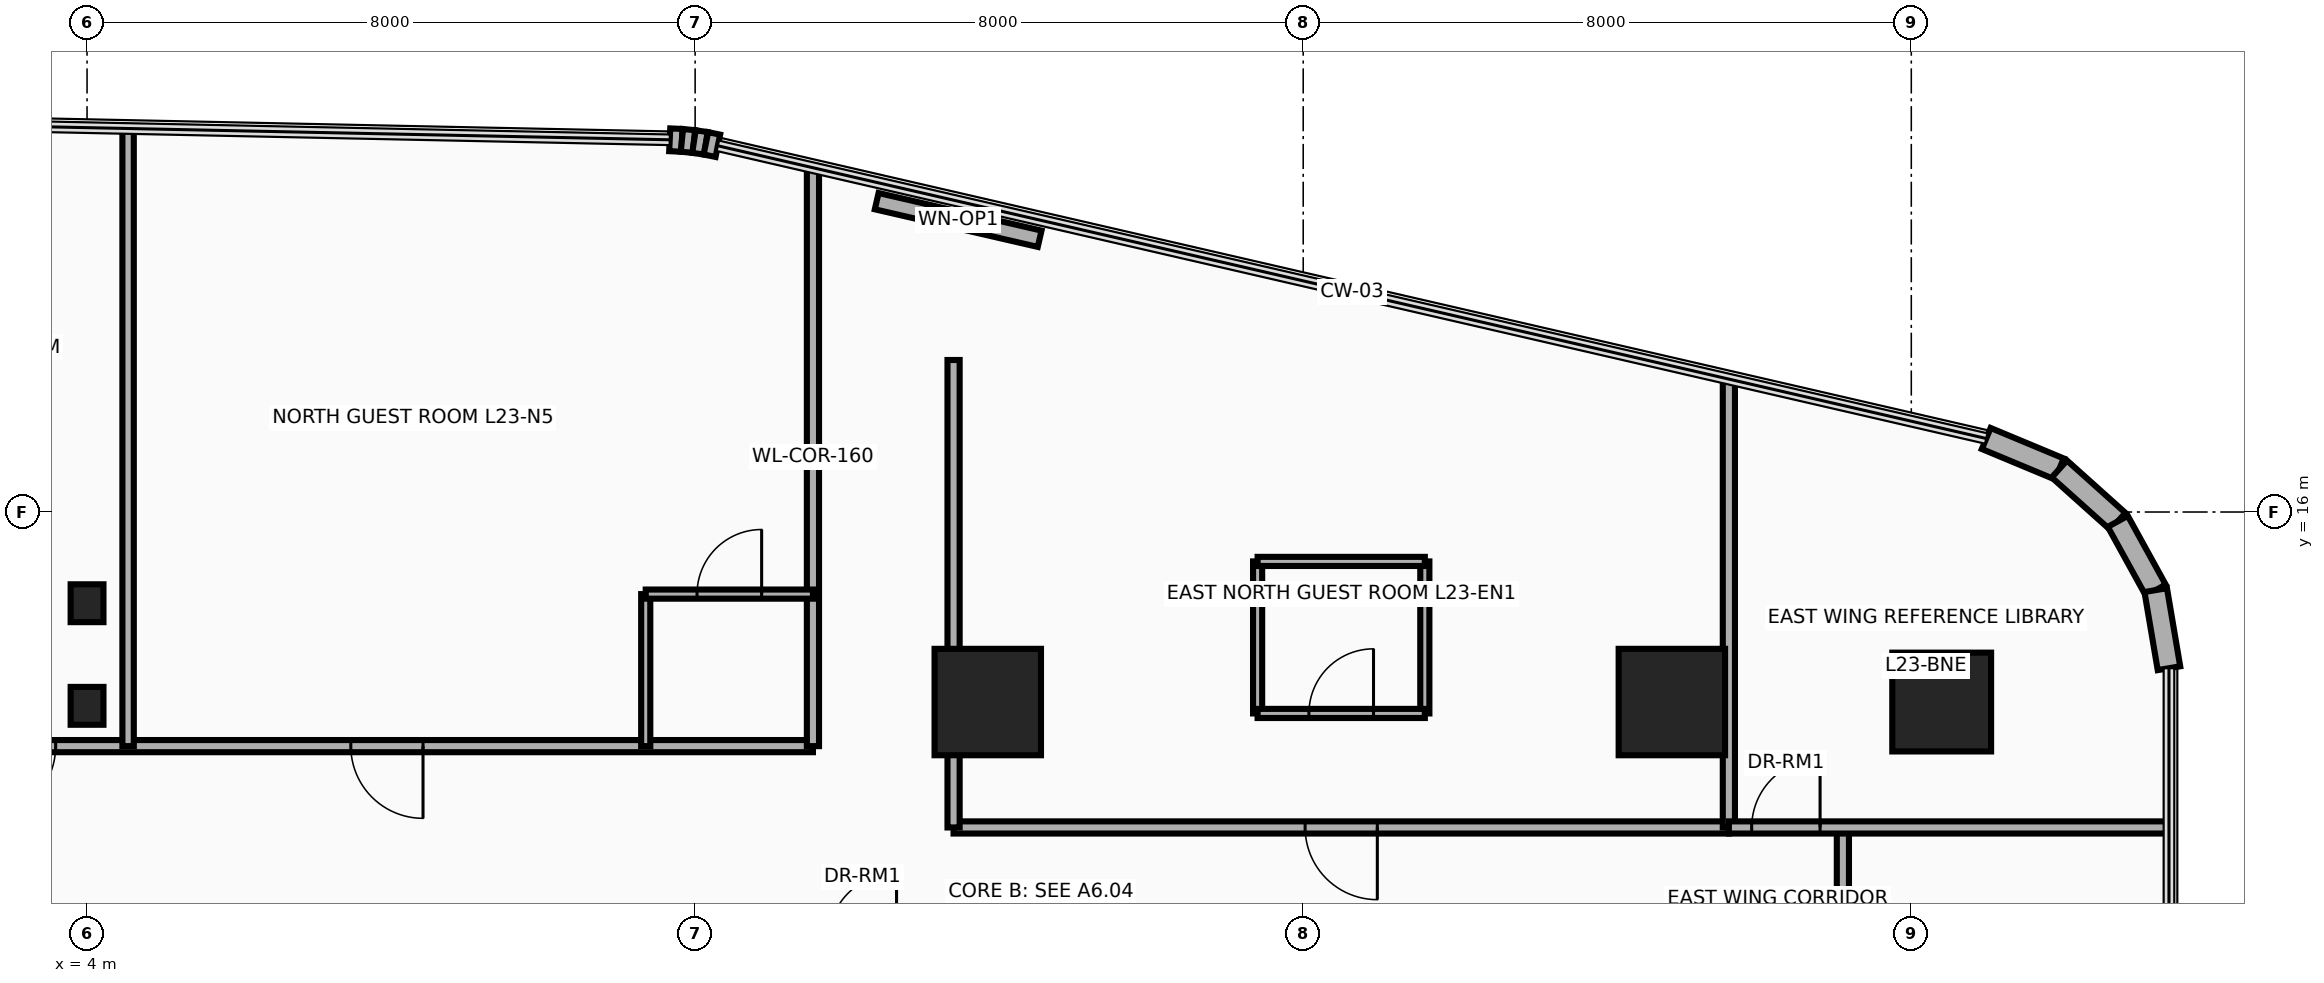
"""IFC4 building model, lengths in metres.
Left out: names, types, materials, properties, quantities, classifications, styles, units other than length and angle.
Written with IfcOpenShell. Run it as: python <this file> out.ifc"""

import sys

from ifc_helpers import new_model, si_unit, direction, frame, frame_2d, origin, origin_2d, place, context, subcontext, project, spatial, rectangle, circle, i_section, extrude, source, transform, mapped, element, fill, save


model = new_model("IFC4")
c1 = context("Model", 3, precision=1e-05, world=origin(), true_north=direction((0.0, 1.0)))
c2 = subcontext(c1, "Body", "Model", "MODEL_VIEW")
j1 = project(units=[si_unit("LENGTHUNIT", "METRE"), si_unit("PLANEANGLEUNIT", "RADIAN")], contexts=[c1])
p1 = place(None, origin())
s1 = spatial("IfcSite", under=j1, at=p1, CompositionType="ELEMENT")
p2 = place(p1, origin())
s2 = spatial("IfcBuilding", under=s1, at=p2, CompositionType="ELEMENT")
p3 = place(p2, frame((0.0, 0.0, 92.6)))
s3 = spatial("IfcBuildingStorey", under=s2, at=p3, CompositionType="ELEMENT", Elevation=92.6)
m1 = source(origin(), c2, "Body", "SweptSolid", [
    extrude(rectangle(XDim=1.4, YDim=1.4, at=origin_2d()), origin(), (0.0, 0.0, 1.0), 3.7),
])
for number, where, z_axis, x_axis in (
    (1, (15.85, 13.5, 0.0), (0.0, 0.0, 1.0), (1.0, 0.0, 0.0)),
    (2, (24.85, 13.5, 0.0), (0.0, 0.0, 1.0), (1.0, 0.0, 0.0)),
):
    element("IfcColumn", number, at=place(p3, frame(where, z_axis=z_axis, x_axis=x_axis)), inside=s3, PredefinedType="COLUMN", context=c2, shape_type="MappedRepresentation", body=[
        mapped(m1, transform((0.0, 0.0, 0.0), x_axis=(1.0, 0.0, 0.0), y_axis=(0.0, 1.0, 0.0), z_axis=(0.0, 0.0, 1.0), scale=1.0)),
    ])
m2 = source(origin(), c2, "Body", "SweptSolid", [
    extrude(circle(Radius=0.65, at=origin_2d()), origin(), (0.0, 0.0, 1.0), 3.7),
])
p4 = place(p3, frame((28.4, 13.5, 0.0), z_axis=(0.0, 0.0, 1.0), x_axis=(1.0, 0.0, 0.0)))
e3 = element("IfcColumn", 3, at=p4, inside=s3, PredefinedType="COLUMN", context=c2, shape_type="MappedRepresentation", body=[
    mapped(m2, transform((0.0, 0.0, 0.0), x_axis=(1.0, 0.0, 0.0), y_axis=(0.0, 1.0, 0.0), z_axis=(0.0, 0.0, 1.0), scale=1.0)),
])
m3 = source(origin(), c2, "Body", "SweptSolid", [
    extrude(i_section(OverallWidth=0.432, OverallDepth=0.498, WebThickness=0.056, FlangeThickness=0.089, at=origin_2d()), origin(), (0.0, 0.0, 1.0), 3.7),
])
for number, where, z_axis, x_axis in (
    (4, (4.0, 13.45, 0.0), (0.0, 0.0, 1.0), (1.0, 0.0, 0.0)),
    (5, (4.0, 14.8, 0.0), (0.0, 0.0, 1.0), (1.0, 0.0, 0.0)),
):
    element("IfcColumn", number, at=place(p3, frame(where, z_axis=z_axis, x_axis=x_axis)), inside=s3, PredefinedType="COLUMN", context=c2, shape_type="MappedRepresentation", body=[
        mapped(m3, transform((0.0, 0.0, 0.0), x_axis=(1.0, 0.0, 0.0), y_axis=(0.0, 1.0, 0.0), z_axis=(0.0, 0.0, 1.0), scale=1.0)),
    ])
p5 = place(p3, frame((11.666, 20.897, 0.0), z_axis=(0.0, 0.0, 1.0), x_axis=(0.998885297239, -0.047203421059, 0.0)))
e6 = element("IfcWall", 6, at=p5, inside=s3, PredefinedType="SOLIDWALL", context=c2, shape_type="SweptSolid", body=[
    extrude(rectangle(XDim=0.16, YDim=0.3, at=frame_2d((0.08, 0.0))), origin(), (0.0, 0.0, 1.0), 3.46),
])
p6 = place(p3, frame((11.826, 20.889, 0.0), z_axis=(0.0, 0.0, 1.0), x_axis=(0.995172891136, -0.098137234257, 0.0)))
e7 = element("IfcWall", 7, at=p6, inside=s3, PredefinedType="SOLIDWALL", context=c2, shape_type="SweptSolid", body=[
    extrude(rectangle(XDim=0.159, YDim=0.3, at=frame_2d((0.08, 0.0))), origin(), (0.0, 0.0, 1.0), 3.46),
])
p7 = place(p3, frame((11.984, 20.874, 0.0), z_axis=(0.0, 0.0, 1.0), x_axis=(0.988846069207, -0.148941100486, 0.0)))
e8 = element("IfcWall", 8, at=p7, inside=s3, PredefinedType="SOLIDWALL", context=c2, shape_type="SweptSolid", body=[
    extrude(rectangle(XDim=0.159, YDim=0.3, at=frame_2d((0.08, 0.0))), origin(), (0.0, 0.0, 1.0), 3.46),
])
p8 = place(p3, frame((12.142, 20.85, 0.0), z_axis=(0.0, 0.0, 1.0), x_axis=(0.979991950448, -0.19903712482, 0.0)))
e9 = element("IfcWall", 9, at=p8, inside=s3, PredefinedType="SOLIDWALL", context=c2, shape_type="SweptSolid", body=[
    extrude(rectangle(XDim=0.161, YDim=0.3, at=frame_2d((0.08, 0.0))), origin(), (0.0, 0.0, 1.0), 3.46),
])
p9 = place(p3, frame((14.389, 20.09, 0.0), z_axis=(0.0, 0.0, 1.0), x_axis=(0.974400545997, -0.224818984875, 0.0)))
e10 = element("IfcWall", 10, at=p9, inside=s3, PredefinedType="SOLIDWALL", context=c2, shape_type="SweptSolid", body=[
    extrude(rectangle(XDim=2.2, YDim=0.22, at=frame_2d((1.1, 0.0))), origin(), (0.0, 0.0, 1.0), 3.46),
])
p10 = place(p9, frame((0.65, 0.0, 0.95)))
e11 = element("IfcOpeningElement", 11, at=p10, cuts=e10, PredefinedType="OPENING", context=c2, shape_type="SweptSolid", body=[
    extrude(rectangle(XDim=0.9, YDim=1.3, at=frame_2d((0.45, 0.65))), frame((0.0, 0.125, 0.0), z_axis=(0.0, -1.0, 0.0), x_axis=(1.0, 0.0, 0.0)), (0.0, 0.0, 1.0), 0.25),
])
p11 = place(p3, frame((28.986, 16.967, 0.0), z_axis=(0.0, 0.0, 1.0), x_axis=(0.923083852684, -0.384598753136, 0.0)))
e12 = element("IfcWall", 12, at=p11, inside=s3, PredefinedType="SOLIDWALL", context=c2, shape_type="SweptSolid", body=[
    extrude(rectangle(XDim=1.042, YDim=0.3, at=frame_2d((0.521, 0.0))), origin(), (0.0, 0.0, 1.0), 3.46),
])
p12 = place(p3, frame((29.948, 16.566, 0.0), z_axis=(0.0, 0.0, 1.0), x_axis=(0.744585645533, -0.66752694063, 0.0)))
e13 = element("IfcWall", 13, at=p12, inside=s3, PredefinedType="SOLIDWALL", context=c2, shape_type="SweptSolid", body=[
    extrude(rectangle(XDim=1.033, YDim=0.3, at=frame_2d((0.517, 0.0))), origin(), (0.0, 0.0, 1.0), 3.46),
])
p13 = place(p3, frame((30.717, 15.877, 0.0), z_axis=(0.0, 0.0, 1.0), x_axis=(0.482971098131, -0.875636293429, 0.0)))
e14 = element("IfcWall", 14, at=p13, inside=s3, PredefinedType="SOLIDWALL", context=c2, shape_type="SweptSolid", body=[
    extrude(rectangle(XDim=1.033, YDim=0.3, at=frame_2d((0.516, 0.0))), origin(), (0.0, 0.0, 1.0), 3.46),
])
p14 = place(p3, frame((31.216, 14.973, 0.0), z_axis=(0.0, 0.0, 1.0), x_axis=(0.167019462117, -0.985953598946, 0.0)))
e15 = element("IfcWall", 15, at=p14, inside=s3, PredefinedType="SOLIDWALL", context=c2, shape_type="SweptSolid", body=[
    extrude(rectangle(XDim=1.042, YDim=0.3, at=frame_2d((0.521, 0.0))), origin(), (0.0, 0.0, 1.0), 3.46),
])
p15 = place(p3, frame((-31.89, 12.92, 0.0), z_axis=(0.0, 0.0, 1.0), x_axis=(1.0, 0.0, 0.0)))
e16 = element("IfcWall", 16, at=p15, inside=s3, PredefinedType="PARTITIONING", context=c2, shape_type="SweptSolid", body=[
    extrude(rectangle(XDim=45.44, YDim=0.16, at=frame_2d((22.72, 0.0))), origin(), (0.0, 0.0, 1.0), 2.583),
])
p16 = place(p15, frame((4.225, 0.0, 0.0)))
e17 = element("IfcOpeningElement", 17, at=p16, cuts=e16, PredefinedType="OPENING", context=c2, shape_type="SweptSolid", body=[
    extrude(rectangle(XDim=0.95, YDim=2.15, at=frame_2d((0.475, 1.075))), frame((0.0, 0.095, 0.0), z_axis=(0.0, -1.0, 0.0), x_axis=(1.0, 0.0, 0.0)), (0.0, 0.0, 1.0), 0.19),
])
p17 = place(p15, frame((13.43, 0.0, 0.0)))
e18 = element("IfcOpeningElement", 18, at=p17, cuts=e16, PredefinedType="OPENING", context=c2, shape_type="SweptSolid", body=[
    extrude(rectangle(XDim=0.95, YDim=2.15, at=frame_2d((0.475, 1.075))), frame((0.0, 0.095, 0.0), z_axis=(0.0, -1.0, 0.0), x_axis=(1.0, 0.0, 0.0)), (0.0, 0.0, 1.0), 0.19),
])
p18 = place(p15, frame((20.31, 0.0, 0.0)))
e19 = element("IfcOpeningElement", 19, at=p18, cuts=e16, PredefinedType="OPENING", context=c2, shape_type="SweptSolid", body=[
    extrude(rectangle(XDim=0.95, YDim=2.15, at=frame_2d((0.475, 1.075))), frame((0.0, 0.095, 0.0), z_axis=(0.0, -1.0, 0.0), x_axis=(1.0, 0.0, 0.0)), (0.0, 0.0, 1.0), 0.19),
])
p19 = place(p15, frame((25.517, 0.0, 0.0)))
e20 = element("IfcOpeningElement", 20, at=p19, cuts=e16, PredefinedType="OPENING", context=c2, shape_type="SweptSolid", body=[
    extrude(rectangle(XDim=0.95, YDim=2.15, at=frame_2d((0.475, 1.075))), frame((0.0, 0.095, 0.0), z_axis=(0.0, -1.0, 0.0), x_axis=(1.0, 0.0, 0.0)), (0.0, 0.0, 1.0), 0.19),
])
p20 = place(p15, frame((28.373, 0.0, 0.0)))
e21 = element("IfcOpeningElement", 21, at=p20, cuts=e16, PredefinedType="OPENING", context=c2, shape_type="SweptSolid", body=[
    extrude(rectangle(XDim=0.95, YDim=2.15, at=frame_2d((0.475, 1.075))), frame((0.0, 0.095, 0.0), z_axis=(0.0, -1.0, 0.0), x_axis=(1.0, 0.0, 0.0)), (0.0, 0.0, 1.0), 0.19),
])
p21 = place(p15, frame((34.527, 0.0, 0.0)))
e22 = element("IfcOpeningElement", 22, at=p21, cuts=e16, PredefinedType="OPENING", context=c2, shape_type="SweptSolid", body=[
    extrude(rectangle(XDim=0.95, YDim=2.15, at=frame_2d((0.475, 1.075))), frame((0.0, 0.095, 0.0), z_axis=(0.0, -1.0, 0.0), x_axis=(1.0, 0.0, 0.0)), (0.0, 0.0, 1.0), 0.19),
])
p22 = place(p15, frame((39.36, 0.0, 0.0)))
e23 = element("IfcOpeningElement", 23, at=p22, cuts=e16, PredefinedType="OPENING", context=c2, shape_type="SweptSolid", body=[
    extrude(rectangle(XDim=0.95, YDim=2.15, at=frame_2d((0.475, 1.075))), frame((0.0, 0.095, 0.0), z_axis=(0.0, -1.0, 0.0), x_axis=(1.0, 0.0, 0.0)), (0.0, 0.0, 1.0), 0.19),
])
p23 = place(p3, frame((13.55, 12.92, 0.0), z_axis=(0.0, 0.0, 1.0), x_axis=(0.0, 1.0, 0.0)))
e24 = element("IfcWall", 24, at=p23, inside=s3, PredefinedType="PARTITIONING", context=c2, shape_type="SweptSolid", body=[
    extrude(rectangle(XDim=7.609, YDim=0.16, at=frame_2d((3.805, 0.0))), origin(), (0.0, 0.0, 1.0), 2.583),
])
p24 = place(p3, frame((4.54, 12.92, 0.0), z_axis=(0.0, 0.0, 1.0), x_axis=(0.0, 1.0, 0.0)))
e25 = element("IfcWall", 25, at=p24, inside=s3, PredefinedType="PARTITIONING", context=c2, shape_type="SweptSolid", body=[
    extrude(rectangle(XDim=8.125, YDim=0.15, at=frame_2d((4.063, 0.0))), origin(), (0.0, 0.0, 1.0), 2.583),
])
p25 = place(p3, frame((11.35, 12.92, 0.0), z_axis=(0.0, 0.0, 1.0), x_axis=(0.0, 1.0, 0.0)))
e26 = element("IfcWall", 26, at=p25, inside=s3, PredefinedType="PARTITIONING", context=c2, shape_type="SweptSolid", body=[
    extrude(rectangle(XDim=2.0, YDim=0.12, at=frame_2d((1.0, 0.0))), origin(), (0.0, 0.0, 1.0), 2.583),
])
p26 = place(p3, frame((11.35, 14.92, 0.0), z_axis=(0.0, 0.0, 1.0), x_axis=(1.0, 0.0, 0.0)))
e27 = element("IfcWall", 27, at=p26, inside=s3, PredefinedType="PARTITIONING", context=c2, shape_type="SweptSolid", body=[
    extrude(rectangle(XDim=2.2, YDim=0.12, at=frame_2d((1.1, 0.0))), origin(), (0.0, 0.0, 1.0), 3.46),
])
p27 = place(p26, frame((0.675, 0.0, 0.0)))
e28 = element("IfcOpeningElement", 28, at=p27, cuts=e27, PredefinedType="OPENING", context=c2, shape_type="SweptSolid", body=[
    extrude(rectangle(XDim=0.85, YDim=2.1, at=frame_2d((0.425, 1.05))), frame((0.0, 0.075, 0.0), z_axis=(0.0, -1.0, 0.0), x_axis=(1.0, 0.0, 0.0)), (0.0, 0.0, 1.0), 0.15),
])
p28 = place(p3, frame((15.4, 11.85, 0.0), z_axis=(0.0, 0.0, 1.0), x_axis=(1.0, 0.0, 0.0)))
e29 = element("IfcWall", 29, at=p28, inside=s3, PredefinedType="PARTITIONING", context=c2, shape_type="SweptSolid", body=[
    extrude(rectangle(XDim=10.2, YDim=0.16, at=frame_2d((5.1, 0.0))), origin(), (0.0, 0.0, 1.0), 2.834),
])
p29 = place(p28, frame((4.625, 0.0, 0.0)))
e30 = element("IfcOpeningElement", 30, at=p29, cuts=e29, PredefinedType="OPENING", context=c2, shape_type="SweptSolid", body=[
    extrude(rectangle(XDim=0.95, YDim=2.15, at=frame_2d((0.475, 1.075))), frame((0.0, 0.095, 0.0), z_axis=(0.0, -1.0, 0.0), x_axis=(1.0, 0.0, 0.0)), (0.0, 0.0, 1.0), 0.19),
])
p30 = place(p3, frame((15.4, 11.85, 0.0), z_axis=(0.0, 0.0, 1.0), x_axis=(0.0, 1.0, 0.0)))
e31 = element("IfcWall", 31, at=p30, inside=s3, PredefinedType="PARTITIONING", context=c2, shape_type="SweptSolid", body=[
    extrude(rectangle(XDim=6.15, YDim=0.16, at=frame_2d((3.075, 0.0))), origin(), (0.0, 0.0, 1.0), 2.583),
])
p31 = place(p3, frame((25.6, 11.85, 0.0), z_axis=(0.0, 0.0, 1.0), x_axis=(0.0, 1.0, 0.0)))
e32 = element("IfcWall", 32, at=p31, inside=s3, PredefinedType="PARTITIONING", context=c2, shape_type="SweptSolid", body=[
    extrude(rectangle(XDim=5.898, YDim=0.16, at=frame_2d((2.949, 0.0))), origin(), (0.0, 0.0, 1.0), 2.583),
])
for number, where, z_axis, x_axis in (
    (33, (19.4, 13.35, 0.0), (0.0, 0.0, 1.0), (0.0, 1.0, 0.0)),
    (34, (21.6, 13.35, 0.0), (0.0, 0.0, 1.0), (0.0, 1.0, 0.0)),
):
    element("IfcWall", number, at=place(p3, frame(where, z_axis=z_axis, x_axis=x_axis)), inside=s3, PredefinedType="PARTITIONING", context=c2, shape_type="SweptSolid", body=[
        extrude(rectangle(XDim=2.0, YDim=0.12, at=frame_2d((1.0, 0.0))), origin(), (0.0, 0.0, 1.0), 2.583),
    ])
p32 = place(p3, frame((19.4, 15.35, 0.0), z_axis=(0.0, 0.0, 1.0), x_axis=(1.0, 0.0, 0.0)))
e35 = element("IfcWall", 35, at=p32, inside=s3, PredefinedType="PARTITIONING", context=c2, shape_type="SweptSolid", body=[
    extrude(rectangle(XDim=2.2, YDim=0.12, at=frame_2d((1.1, 0.0))), origin(), (0.0, 0.0, 1.0), 3.46),
])
p33 = place(p3, frame((19.4, 13.35, 0.0), z_axis=(0.0, 0.0, 1.0), x_axis=(1.0, 0.0, 0.0)))
e36 = element("IfcWall", 36, at=p33, inside=s3, PredefinedType="PARTITIONING", context=c2, shape_type="SweptSolid", body=[
    extrude(rectangle(XDim=2.2, YDim=0.12, at=frame_2d((1.1, 0.0))), origin(), (0.0, 0.0, 1.0), 2.583),
])
p34 = place(p33, frame((0.675, 0.0, 0.0)))
e37 = element("IfcOpeningElement", 37, at=p34, cuts=e36, PredefinedType="OPENING", context=c2, shape_type="SweptSolid", body=[
    extrude(rectangle(XDim=0.85, YDim=2.1, at=frame_2d((0.425, 1.05))), frame((0.0, 0.075, 0.0), z_axis=(0.0, -1.0, 0.0), x_axis=(1.0, 0.0, 0.0)), (0.0, 0.0, 1.0), 0.15),
])
p35 = place(p3, frame((27.1, -13.89, 0.0), z_axis=(0.0, 0.0, 1.0), x_axis=(0.0, 1.0, 0.0)))
e38 = element("IfcWall", 38, at=p35, inside=s3, PredefinedType="PARTITIONING", context=c2, shape_type="SweptSolid", body=[
    extrude(rectangle(XDim=25.74, YDim=0.16, at=frame_2d((12.87, 0.0))), origin(), (0.0, 0.0, 1.0), 2.583),
])
p36 = place(p35, frame((5.258, 0.0, 0.0)))
e39 = element("IfcOpeningElement", 39, at=p36, cuts=e38, PredefinedType="OPENING", context=c2, shape_type="SweptSolid", body=[
    extrude(rectangle(XDim=1.8, YDim=2.15, at=frame_2d((0.9, 1.075))), frame((0.0, 0.095, 0.0), z_axis=(0.0, -1.0, 0.0), x_axis=(1.0, 0.0, 0.0)), (0.0, 0.0, 1.0), 0.19),
])
p37 = place(p35, frame((18.128, 0.0, 0.0)))
e40 = element("IfcOpeningElement", 40, at=p37, cuts=e38, PredefinedType="OPENING", context=c2, shape_type="SweptSolid", body=[
    extrude(rectangle(XDim=1.8, YDim=2.15, at=frame_2d((0.9, 1.075))), frame((0.0, 0.095, 0.0), z_axis=(0.0, -1.0, 0.0), x_axis=(1.0, 0.0, 0.0)), (0.0, 0.0, 1.0), 0.19),
])
p38 = place(p3, frame((25.6, 11.85, 0.0), z_axis=(0.0, 0.0, 1.0), x_axis=(1.0, 0.0, 0.0)))
e41 = element("IfcWall", 41, at=p38, inside=s3, PredefinedType="PARTITIONING", context=c2, shape_type="SweptSolid", body=[
    extrude(rectangle(XDim=5.79, YDim=0.16, at=frame_2d((2.895, 0.0))), origin(), (0.0, 0.0, 1.0), 2.896),
])
p39 = place(p38, frame((0.3, 0.0, 0.0)))
e42 = element("IfcOpeningElement", 42, at=p39, cuts=e41, PredefinedType="OPENING", context=c2, shape_type="SweptSolid", body=[
    extrude(rectangle(XDim=0.9, YDim=2.1, at=frame_2d((0.45, 1.05))), frame((0.0, 0.095, 0.0), z_axis=(0.0, -1.0, 0.0), x_axis=(1.0, 0.0, 0.0)), (0.0, 0.0, 1.0), 0.19),
])
p40 = place(p10, origin())
e43 = element("IfcWindow", 43, at=p40, inside=s3, PartitioningType="SINGLE_PANEL", PredefinedType="WINDOW", context=c2, shape_type="SweptSolid", body=[
    extrude(rectangle(XDim=0.9, YDim=1.3, at=frame_2d((0.45, 0.65))), frame((0.0, 0.03, 0.0), z_axis=(0.0, -1.0, 0.0), x_axis=(1.0, 0.0, 0.0)), (0.0, 0.0, 1.0), 0.06),
])
fill(e11, e43)
p41 = place(p21, frame((0.95, 0.0, 0.0), z_axis=(0.0, 0.0, 1.0), x_axis=(-1.0, 0.0, 0.0)))
e44 = element("IfcDoor", 44, at=p41, inside=s3, OperationType="SINGLE_SWING_LEFT", PredefinedType="DOOR", context=c2, shape_type="SweptSolid", body=[
    extrude(rectangle(XDim=0.95, YDim=2.15, at=frame_2d((0.475, 1.075))), frame((0.0, 0.025, 0.0), z_axis=(0.0, -1.0, 0.0), x_axis=(1.0, 0.0, 0.0)), (0.0, 0.0, 1.0), 0.05),
])
fill(e22, e44)
p42 = place(p22, frame((0.95, 0.0, 0.0), z_axis=(0.0, 0.0, 1.0), x_axis=(-1.0, 0.0, 0.0)))
e45 = element("IfcDoor", 45, at=p42, inside=s3, OperationType="SINGLE_SWING_LEFT", PredefinedType="DOOR", context=c2, shape_type="SweptSolid", body=[
    extrude(rectangle(XDim=0.95, YDim=2.15, at=frame_2d((0.475, 1.075))), frame((0.0, 0.025, 0.0), z_axis=(0.0, -1.0, 0.0), x_axis=(1.0, 0.0, 0.0)), (0.0, 0.0, 1.0), 0.05),
])
fill(e23, e45)
p43 = place(p27, origin())
e46 = element("IfcDoor", 46, at=p43, inside=s3, OperationType="SINGLE_SWING_RIGHT", PredefinedType="DOOR", context=c2, shape_type="SweptSolid", body=[
    extrude(rectangle(XDim=0.85, YDim=2.1, at=frame_2d((0.425, 1.05))), frame((0.0, 0.025, 0.0), z_axis=(0.0, -1.0, 0.0), x_axis=(1.0, 0.0, 0.0)), (0.0, 0.0, 1.0), 0.05),
])
fill(e28, e46)
p44 = place(p29, frame((0.95, 0.0, 0.0), z_axis=(0.0, 0.0, 1.0), x_axis=(-1.0, 0.0, 0.0)))
e47 = element("IfcDoor", 47, at=p44, inside=s3, OperationType="SINGLE_SWING_LEFT", PredefinedType="DOOR", context=c2, shape_type="SweptSolid", body=[
    extrude(rectangle(XDim=0.95, YDim=2.15, at=frame_2d((0.475, 1.075))), frame((0.0, 0.025, 0.0), z_axis=(0.0, -1.0, 0.0), x_axis=(1.0, 0.0, 0.0)), (0.0, 0.0, 1.0), 0.05),
])
fill(e30, e47)
p45 = place(p34, origin())
e48 = element("IfcDoor", 48, at=p45, inside=s3, OperationType="SINGLE_SWING_RIGHT", PredefinedType="DOOR", context=c2, shape_type="SweptSolid", body=[
    extrude(rectangle(XDim=0.85, YDim=2.1, at=frame_2d((0.425, 1.05))), frame((0.0, 0.025, 0.0), z_axis=(0.0, -1.0, 0.0), x_axis=(1.0, 0.0, 0.0)), (0.0, 0.0, 1.0), 0.05),
])
fill(e37, e48)
p46 = place(p39, origin())
e49 = element("IfcDoor", 49, at=p46, inside=s3, OperationType="SINGLE_SWING_RIGHT", PredefinedType="DOOR", context=c2, shape_type="SweptSolid", body=[
    extrude(rectangle(XDim=0.9, YDim=2.1, at=frame_2d((0.45, 1.05))), frame((0.0, 0.025, 0.0), z_axis=(0.0, -1.0, 0.0), x_axis=(1.0, 0.0, 0.0)), (0.0, 0.0, 1.0), 0.05),
])
fill(e42, e49)
save(model, sys.argv[1])
